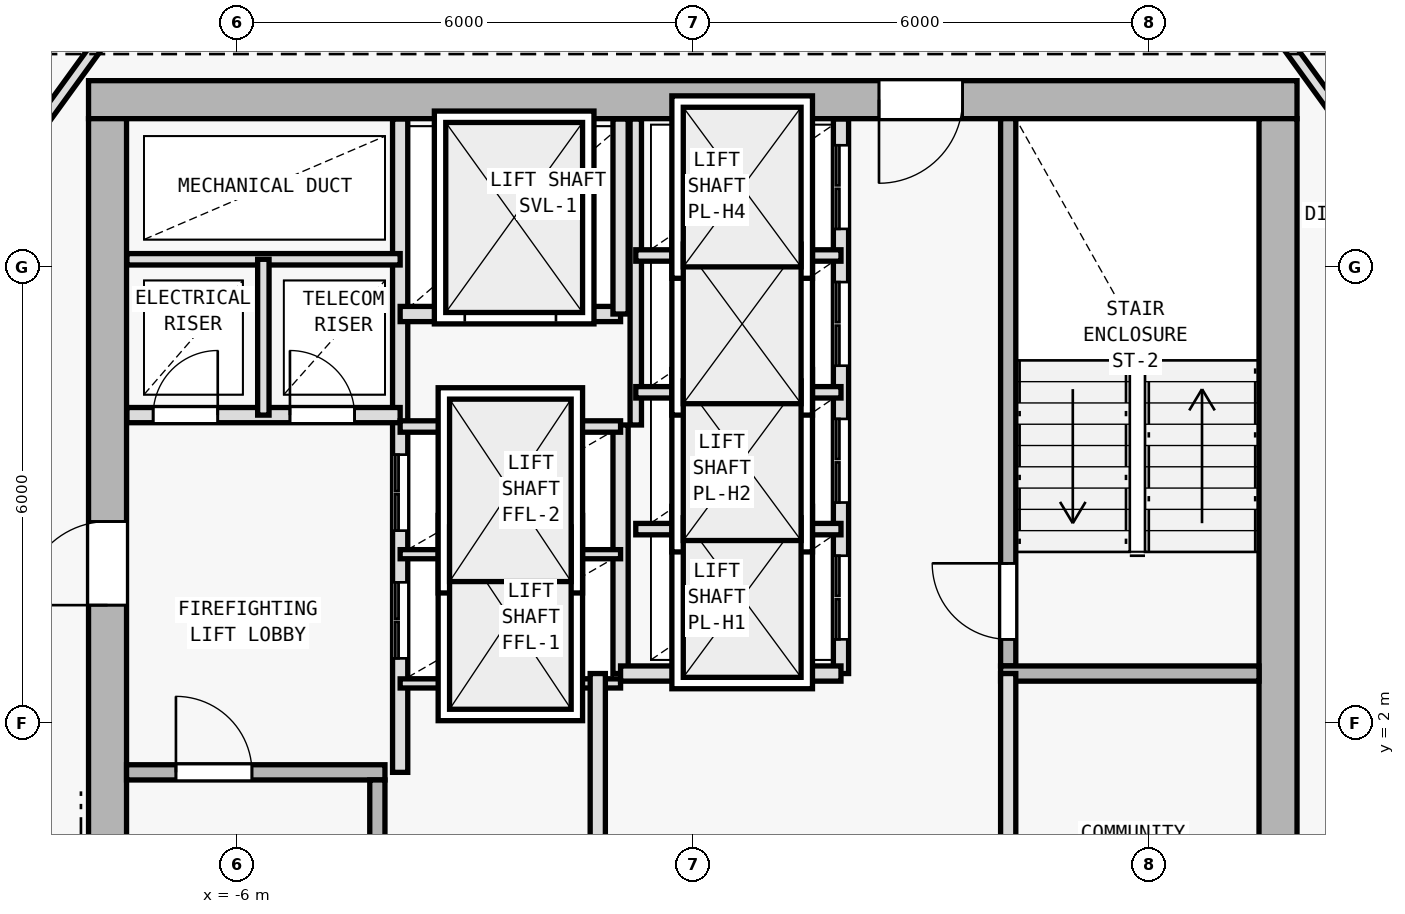
"""IFC4 building model, lengths in metres.
Left out: names, types, materials, properties, quantities, classifications, styles, units other than length and angle.
Written with IfcOpenShell. Run it as: python <this file> out.ifc"""

import sys

from ifc_helpers import new_model, si_unit, direction, frame, frame_2d, origin, origin_2d, place, context, subcontext, project, spatial, rectangle, i_section, extrude, element, fill, save


model = new_model("IFC4")
c1 = context("Model", 3, precision=1e-05, world=origin(), true_north=direction((0.0, 1.0)))
c2 = subcontext(c1, "Body", "Model", "MODEL_VIEW")
j1 = project(units=[si_unit("LENGTHUNIT", "METRE"), si_unit("PLANEANGLEUNIT", "RADIAN")], contexts=[c1])
p1 = place(None, origin())
s1 = spatial("IfcSite", under=j1, at=p1, CompositionType="ELEMENT")
p2 = place(p1, origin())
s2 = spatial("IfcBuilding", under=s1, at=p2, CompositionType="ELEMENT")
p3 = place(p2, frame((0.0, 0.0, 268.8)))
s3 = spatial("IfcBuildingStorey", under=s2, at=p3, CompositionType="ELEMENT", Elevation=268.8)
for number, where, z_axis, x_axis in (
    (1, (7.7, 10.2, 0.0), (0.0, 0.0, 1.0), (1.0, 0.0, 0.0)),
    (2, (-7.7, 10.2, 0.0), (0.0, 0.0, 1.0), (1.0, 0.0, 0.0)),
    (3, (7.7, 0.4, 0.0), (0.0, 0.0, 1.0), (1.0, 0.0, 0.0)),
    (4, (-7.7, 2.0, 0.0), (0.0, 0.0, 1.0), (1.0, 0.0, 0.0)),
):
    element("IfcColumn", number, at=place(p3, frame(where, z_axis=z_axis, x_axis=x_axis)), inside=s3, PredefinedType="COLUMN", context=c2, shape_type="SweptSolid", body=[
        extrude(i_section(OverallWidth=0.374, OverallDepth=0.372, WebThickness=0.012, FlangeThickness=0.02, FilletRadius=0.015, at=origin_2d()), origin(), (0.0, 0.0, 1.0), 3.6),
    ])
p4 = place(p3, frame((7.95, 10.2, 0.0), z_axis=(0.0, 0.0, 1.0), x_axis=(-1.0, 0.0, 0.0)))
e5 = element("IfcWall", 5, at=p4, inside=s3, PredefinedType="SHEAR", context=c2, shape_type="SweptSolid", body=[
    extrude(rectangle(XDim=15.9, YDim=0.5, at=frame_2d((7.95, 0.0))), origin(), (0.0, 0.0, 1.0), 3.35),
])
p5 = place(p4, frame((4.4, 0.0, 0.0)))
e6 = element("IfcOpeningElement", 6, at=p5, cuts=e5, PredefinedType="OPENING", context=c2, shape_type="SweptSolid", body=[
    extrude(rectangle(XDim=1.1, YDim=2.15, at=frame_2d((0.55, 1.075))), frame((0.0, 0.26, 0.0), z_axis=(0.0, -1.0, 0.0), x_axis=(1.0, 0.0, 0.0)), (0.0, 0.0, 1.0), 0.52),
])
p6 = place(p3, frame((-7.7, -9.15, 0.0), z_axis=(0.0, 0.0, 1.0), x_axis=(0.0, 1.0, 0.0)))
e7 = element("IfcWall", 7, at=p6, inside=s3, PredefinedType="SHEAR", context=c2, shape_type="SweptSolid", body=[
    extrude(rectangle(XDim=19.1, YDim=0.5, at=frame_2d((9.55, 0.0))), origin(), (0.0, 0.0, 1.0), 3.35),
])
p7 = place(p6, frame((12.7, 0.0, 0.0)))
e8 = element("IfcOpeningElement", 8, at=p7, cuts=e7, PredefinedType="OPENING", context=c2, shape_type="SweptSolid", body=[
    extrude(rectangle(XDim=1.1, YDim=2.15, at=frame_2d((0.55, 1.075))), frame((0.0, 0.26, 0.0), z_axis=(0.0, -1.0, 0.0), x_axis=(1.0, 0.0, 0.0)), (0.0, 0.0, 1.0), 0.52),
])
p8 = place(p3, frame((7.7, 9.95, 0.0), z_axis=(0.0, 0.0, 1.0), x_axis=(0.0, -1.0, 0.0)))
e9 = element("IfcWall", 9, at=p8, inside=s3, PredefinedType="SHEAR", context=c2, shape_type="SweptSolid", body=[
    extrude(rectangle(XDim=19.1, YDim=0.5, at=frame_2d((9.55, 0.0))), origin(), (0.0, 0.0, 1.0), 3.35),
])
p9 = place(p3, frame((-7.45, 1.35, 0.0), z_axis=(0.0, 0.0, 1.0), x_axis=(1.0, 0.0, 0.0)))
e10 = element("IfcWall", 10, at=p9, inside=s3, PredefinedType="SOLIDWALL", context=c2, shape_type="SweptSolid", body=[
    extrude(rectangle(XDim=3.4, YDim=0.2, at=frame_2d((1.7, 0.0))), origin(), (0.0, 0.0, 1.0), 3.35),
])
p10 = place(p9, frame((0.65, 0.0, 0.0)))
e11 = element("IfcOpeningElement", 11, at=p10, cuts=e10, PredefinedType="OPENING", context=c2, shape_type="SweptSolid", body=[
    extrude(rectangle(XDim=1.0, YDim=2.15, at=frame_2d((0.5, 1.075))), frame((0.0, 0.11, 0.0), z_axis=(0.0, -1.0, 0.0), x_axis=(1.0, 0.0, 0.0)), (0.0, 0.0, 1.0), 0.22),
])
p11 = place(p3, frame((-4.15, -5.95, 0.0), z_axis=(0.0, 0.0, 1.0), x_axis=(0.0, 1.0, 0.0)))
e12 = element("IfcWall", 12, at=p11, inside=s3, PredefinedType="SOLIDWALL", context=c2, shape_type="SweptSolid", body=[
    extrude(rectangle(XDim=7.2, YDim=0.2, at=frame_2d((3.6, 0.0))), origin(), (0.0, 0.0, 1.0), 3.35),
])
p12 = place(p3, frame((-3.85, 1.35, 0.0), z_axis=(0.0, 0.0, 1.0), x_axis=(0.0, 1.0, 0.0)))
e13 = element("IfcWall", 13, at=p12, inside=s3, PredefinedType="SOLIDWALL", context=c2, shape_type="SweptSolid", body=[
    extrude(rectangle(XDim=8.595, YDim=0.2, at=frame_2d((4.297, 0.0))), origin(), (0.0, 0.0, 1.0), 3.35),
])
p13 = place(p12, frame((1.5, 0.0, 0.0)))
e14 = element("IfcOpeningElement", 14, at=p13, cuts=e13, PredefinedType="OPENING", context=c2, shape_type="SweptSolid", body=[
    extrude(rectangle(XDim=1.0, YDim=2.15, at=frame_2d((0.5, 1.075))), frame((0.0, 0.11, 0.0), z_axis=(0.0, -1.0, 0.0), x_axis=(1.0, 0.0, 0.0)), (0.0, 0.0, 1.0), 0.22),
])
p14 = place(p12, frame((3.18, 0.0, 0.0)))
e15 = element("IfcOpeningElement", 15, at=p14, cuts=e13, PredefinedType="OPENING", context=c2, shape_type="SweptSolid", body=[
    extrude(rectangle(XDim=1.0, YDim=2.15, at=frame_2d((0.5, 1.075))), frame((0.0, 0.11, 0.0), z_axis=(0.0, -1.0, 0.0), x_axis=(1.0, 0.0, 0.0)), (0.0, 0.0, 1.0), 0.22),
])
p15 = place(p3, frame((-7.445, 6.05, 0.0), z_axis=(0.0, 0.0, 1.0), x_axis=(1.0, 0.0, 0.0)))
e16 = element("IfcWall", 16, at=p15, inside=s3, PredefinedType="SOLIDWALL", context=c2, shape_type="SweptSolid", body=[
    extrude(rectangle(XDim=3.595, YDim=0.2, at=frame_2d((1.797, 0.0))), origin(), (0.0, 0.0, 1.0), 3.35),
])
p16 = place(p15, frame((0.345, 0.0, 0.0)))
e17 = element("IfcOpeningElement", 17, at=p16, cuts=e16, PredefinedType="OPENING", context=c2, shape_type="SweptSolid", body=[
    extrude(rectangle(XDim=0.85, YDim=2.1, at=frame_2d((0.425, 1.05))), frame((0.0, 0.11, 0.0), z_axis=(0.0, -1.0, 0.0), x_axis=(1.0, 0.0, 0.0)), (0.0, 0.0, 1.0), 0.22),
])
p17 = place(p15, frame((2.145, 0.0, 0.0)))
e18 = element("IfcOpeningElement", 18, at=p17, cuts=e16, PredefinedType="OPENING", context=c2, shape_type="SweptSolid", body=[
    extrude(rectangle(XDim=0.85, YDim=2.1, at=frame_2d((0.425, 1.05))), frame((0.0, 0.11, 0.0), z_axis=(0.0, -1.0, 0.0), x_axis=(1.0, 0.0, 0.0)), (0.0, 0.0, 1.0), 0.22),
])
p18 = place(p3, frame((-7.445, 8.1, 0.0), z_axis=(0.0, 0.0, 1.0), x_axis=(1.0, 0.0, 0.0)))
e19 = element("IfcWall", 19, at=p18, inside=s3, PredefinedType="PARTITIONING", context=c2, shape_type="SweptSolid", body=[
    extrude(rectangle(XDim=3.595, YDim=0.15, at=frame_2d((1.797, 0.0))), origin(), (0.0, 0.0, 1.0), 3.35),
])
p19 = place(p3, frame((-5.65, 6.05, 0.0), z_axis=(0.0, 0.0, 1.0), x_axis=(0.0, 1.0, 0.0)))
e20 = element("IfcWall", 20, at=p19, inside=s3, PredefinedType="PARTITIONING", context=c2, shape_type="SweptSolid", body=[
    extrude(rectangle(XDim=2.05, YDim=0.15, at=frame_2d((1.025, 0.0))), origin(), (0.0, 0.0, 1.0), 3.35),
])
p20 = place(p3, frame((4.15, 2.75, 0.0), z_axis=(0.0, 0.0, 1.0), x_axis=(0.0, 1.0, 0.0)))
e21 = element("IfcWall", 21, at=p20, inside=s3, PredefinedType="SOLIDWALL", context=c2, shape_type="SweptSolid", body=[
    extrude(rectangle(XDim=7.2, YDim=0.2, at=frame_2d((3.6, 0.0))), origin(), (0.0, 0.0, 1.0), 3.35),
])
p21 = place(p20, frame((0.35, 0.0, 0.0)))
e22 = element("IfcOpeningElement", 22, at=p21, cuts=e21, PredefinedType="OPENING", context=c2, shape_type="SweptSolid", body=[
    extrude(rectangle(XDim=1.0, YDim=2.15, at=frame_2d((0.5, 1.075))), frame((0.0, 0.11, 0.0), z_axis=(0.0, -1.0, 0.0), x_axis=(1.0, 0.0, 0.0)), (0.0, 0.0, 1.0), 0.22),
])
p22 = place(p3, frame((4.05, 2.65, 0.0), z_axis=(0.0, 0.0, 1.0), x_axis=(1.0, 0.0, 0.0)))
e23 = element("IfcWall", 23, at=p22, inside=s3, PredefinedType="SOLIDWALL", context=c2, shape_type="SweptSolid", body=[
    extrude(rectangle(XDim=3.4, YDim=0.2, at=frame_2d((1.7, 0.0))), origin(), (0.0, 0.0, 1.0), 3.35),
])
p23 = place(p3, frame((-0.95, 2.65, 0.0), z_axis=(0.0, 0.0, 1.0), x_axis=(0.0, 1.0, 0.0)))
e24 = element("IfcWall", 24, at=p23, inside=s3, PredefinedType="SOLIDWALL", context=c2, shape_type="SweptSolid", body=[
    extrude(rectangle(XDim=3.27, YDim=0.2, at=frame_2d((1.635, 0.0))), origin(), (0.0, 0.0, 1.0), 3.35),
])
for number, where, z_axis, x_axis in (
    (25, (-3.85, 2.52, 0.0), (0.0, 0.0, 1.0), (1.0, 0.0, 0.0)),
    (26, (-3.85, 4.22, 0.0), (0.0, 0.0, 1.0), (1.0, 0.0, 0.0)),
):
    element("IfcWall", number, at=place(p3, frame(where, z_axis=z_axis, x_axis=x_axis)), inside=s3, PredefinedType="PARTITIONING", context=c2, shape_type="SweptSolid", body=[
        extrude(rectangle(XDim=2.9, YDim=0.12, at=frame_2d((1.45, 0.0))), origin(), (0.0, 0.0, 1.0), 3.35),
    ])
p24 = place(p3, frame((-3.85, 5.9, 0.0), z_axis=(0.0, 0.0, 1.0), x_axis=(1.0, 0.0, 0.0)))
e27 = element("IfcWall", 27, at=p24, inside=s3, PredefinedType="PARTITIONING", context=c2, shape_type="SweptSolid", body=[
    extrude(rectangle(XDim=2.9, YDim=0.15, at=frame_2d((1.45, 0.0))), origin(), (0.0, 0.0, 1.0), 3.35),
])
p25 = place(p3, frame((-3.85, 7.38, 0.0), z_axis=(0.0, 0.0, 1.0), x_axis=(1.0, 0.0, 0.0)))
e28 = element("IfcWall", 28, at=p25, inside=s3, PredefinedType="SOLIDWALL", context=c2, shape_type="SweptSolid", body=[
    extrude(rectangle(XDim=2.9, YDim=0.2, at=frame_2d((1.45, 0.0))), origin(), (0.0, 0.0, 1.0), 3.35),
])
p26 = place(p25, frame((0.85, 0.0, 0.0)))
e29 = element("IfcOpeningElement", 29, at=p26, cuts=e28, PredefinedType="OPENING", context=c2, shape_type="SweptSolid", body=[
    extrude(rectangle(XDim=1.2, YDim=2.2, at=frame_2d((0.6, 1.1))), frame((0.0, 0.11, 0.0), z_axis=(0.0, -1.0, 0.0), x_axis=(1.0, 0.0, 0.0)), (0.0, 0.0, 1.0), 0.22),
])
p27 = place(p3, frame((-0.95, 7.38, 0.0), z_axis=(0.0, 0.0, 1.0), x_axis=(0.0, 1.0, 0.0)))
e30 = element("IfcWall", 30, at=p27, inside=s3, PredefinedType="SOLIDWALL", context=c2, shape_type="SweptSolid", body=[
    extrude(rectangle(XDim=2.565, YDim=0.2, at=frame_2d((1.283, 0.0))), origin(), (0.0, 0.0, 1.0), 3.35),
])
p28 = place(p3, frame((4.15, -6.05, 0.0), z_axis=(0.0, 0.0, 1.0), x_axis=(0.0, 1.0, 0.0)))
e31 = element("IfcWall", 31, at=p28, inside=s3, PredefinedType="SOLIDWALL", context=c2, shape_type="SweptSolid", body=[
    extrude(rectangle(XDim=8.7, YDim=0.2, at=frame_2d((4.35, 0.0))), origin(), (0.0, 0.0, 1.0), 3.35),
])
p29 = place(p28, frame((3.6, 0.0, 0.0)))
e32 = element("IfcOpeningElement", 32, at=p29, cuts=e31, PredefinedType="OPENING", context=c2, shape_type="SweptSolid", body=[
    extrude(rectangle(XDim=0.95, YDim=2.1, at=frame_2d((0.475, 1.05))), frame((0.0, 0.11, 0.0), z_axis=(0.0, -1.0, 0.0), x_axis=(1.0, 0.0, 0.0)), (0.0, 0.0, 1.0), 0.22),
])
p30 = place(p3, frame((-1.25, -6.05, 0.0), z_axis=(0.0, 0.0, 1.0), x_axis=(0.0, 1.0, 0.0)))
e33 = element("IfcWall", 33, at=p30, inside=s3, PredefinedType="SOLIDWALL", context=c2, shape_type="SweptSolid", body=[
    extrude(rectangle(XDim=8.7, YDim=0.2, at=frame_2d((4.35, 0.0))), origin(), (0.0, 0.0, 1.0), 3.35),
])
p31 = place(p30, frame((3.4, 0.0, 0.0)))
e34 = element("IfcOpeningElement", 34, at=p31, cuts=e33, PredefinedType="OPENING", context=c2, shape_type="SweptSolid", body=[
    extrude(rectangle(XDim=0.95, YDim=2.1, at=frame_2d((0.475, 1.05))), frame((0.0, 0.11, 0.0), z_axis=(0.0, -1.0, 0.0), x_axis=(1.0, 0.0, 0.0)), (0.0, 0.0, 1.0), 0.22),
])
p32 = place(p3, frame((1.95, 2.65, 0.0), z_axis=(0.0, 0.0, 1.0), x_axis=(0.0, 1.0, 0.0)))
e35 = element("IfcWall", 35, at=p32, inside=s3, PredefinedType="SOLIDWALL", context=c2, shape_type="SweptSolid", body=[
    extrude(rectangle(XDim=7.295, YDim=0.2, at=frame_2d((3.647, 0.0))), origin(), (0.0, 0.0, 1.0), 3.35),
])
p33 = place(p32, frame((0.45, 0.0, 0.0)))
e36 = element("IfcOpeningElement", 36, at=p33, cuts=e35, PredefinedType="OPENING", context=c2, shape_type="SweptSolid", body=[
    extrude(rectangle(XDim=1.1, YDim=2.15, at=frame_2d((0.55, 1.075))), frame((0.0, 0.11, 0.0), z_axis=(0.0, -1.0, 0.0), x_axis=(1.0, 0.0, 0.0)), (0.0, 0.0, 1.0), 0.22),
])
p34 = place(p32, frame((2.25, 0.0, 0.0)))
e37 = element("IfcOpeningElement", 37, at=p34, cuts=e35, PredefinedType="OPENING", context=c2, shape_type="SweptSolid", body=[
    extrude(rectangle(XDim=1.1, YDim=2.15, at=frame_2d((0.55, 1.075))), frame((0.0, 0.11, 0.0), z_axis=(0.0, -1.0, 0.0), x_axis=(1.0, 0.0, 0.0)), (0.0, 0.0, 1.0), 0.22),
])
p35 = place(p32, frame((4.05, 0.0, 0.0)))
e38 = element("IfcOpeningElement", 38, at=p35, cuts=e35, PredefinedType="OPENING", context=c2, shape_type="SweptSolid", body=[
    extrude(rectangle(XDim=1.1, YDim=2.15, at=frame_2d((0.55, 1.075))), frame((0.0, 0.11, 0.0), z_axis=(0.0, -1.0, 0.0), x_axis=(1.0, 0.0, 0.0)), (0.0, 0.0, 1.0), 0.22),
])
p36 = place(p32, frame((5.85, 0.0, 0.0)))
e39 = element("IfcOpeningElement", 39, at=p36, cuts=e35, PredefinedType="OPENING", context=c2, shape_type="SweptSolid", body=[
    extrude(rectangle(XDim=1.1, YDim=2.15, at=frame_2d((0.55, 1.075))), frame((0.0, 0.11, 0.0), z_axis=(0.0, -1.0, 0.0), x_axis=(1.0, 0.0, 0.0)), (0.0, 0.0, 1.0), 0.22),
])
p37 = place(p3, frame((-0.95, 2.65, 0.0), z_axis=(0.0, 0.0, 1.0), x_axis=(1.0, 0.0, 0.0)))
e40 = element("IfcWall", 40, at=p37, inside=s3, PredefinedType="SOLIDWALL", context=c2, shape_type="SweptSolid", body=[
    extrude(rectangle(XDim=2.9, YDim=0.2, at=frame_2d((1.45, 0.0))), origin(), (0.0, 0.0, 1.0), 3.35),
])
p38 = place(p3, frame((-0.75, 5.92, 0.0), z_axis=(0.0, 0.0, 1.0), x_axis=(0.0, 1.0, 0.0)))
e41 = element("IfcWall", 41, at=p38, inside=s3, PredefinedType="PARTITIONING", context=c2, shape_type="SweptSolid", body=[
    extrude(rectangle(XDim=4.025, YDim=0.15, at=frame_2d((2.013, 0.0))), origin(), (0.0, 0.0, 1.0), 3.35),
])
for number, where, z_axis, x_axis in (
    (42, (-0.75, 4.55, 0.0), (0.0, 0.0, 1.0), (1.0, 0.0, 0.0)),
    (43, (-0.75, 6.35, 0.0), (0.0, 0.0, 1.0), (1.0, 0.0, 0.0)),
    (44, (-0.75, 8.15, 0.0), (0.0, 0.0, 1.0), (1.0, 0.0, 0.0)),
):
    element("IfcWall", number, at=place(p3, frame(where, z_axis=z_axis, x_axis=x_axis)), inside=s3, PredefinedType="PARTITIONING", context=c2, shape_type="SweptSolid", body=[
        extrude(rectangle(XDim=2.7, YDim=0.15, at=frame_2d((1.35, 0.0))), origin(), (0.0, 0.0, 1.0), 3.35),
    ])
p39 = place(p3, frame((-9.78, 8.226, 0.0), z_axis=(0.0, 0.0, 1.0), x_axis=(0.586956386413, 0.809618552436, 0.0)))
e45 = element("IfcWall", 45, at=p39, inside=s3, PredefinedType="PARTITIONING", context=c2, shape_type="SweptSolid", body=[
    extrude(rectangle(XDim=5.008, YDim=0.15, at=frame_2d((2.504, 0.0))), origin(), (0.0, 0.0, 1.0), 3.015),
])
p40 = place(p3, frame((6.841, 12.28, 0.0), z_axis=(0.0, 0.0, 1.0), x_axis=(0.586956386413, -0.809618552436, 0.0)))
e46 = element("IfcWall", 46, at=p40, inside=s3, PredefinedType="PARTITIONING", context=c2, shape_type="SweptSolid", body=[
    extrude(rectangle(XDim=5.008, YDim=0.15, at=frame_2d((2.504, 0.0))), origin(), (0.0, 0.0, 1.0), 2.995),
])
p41 = place(p40, frame((2.954, 0.0, 0.0)))
e47 = element("IfcOpeningElement", 47, at=p41, cuts=e46, PredefinedType="OPENING", context=c2, shape_type="SweptSolid", body=[
    extrude(rectangle(XDim=0.9, YDim=2.1, at=frame_2d((0.45, 1.05))), frame((0.0, 0.085, 0.0), z_axis=(0.0, -1.0, 0.0), x_axis=(1.0, 0.0, 0.0)), (0.0, 0.0, 1.0), 0.17),
])
p42 = place(p7, origin())
e48 = element("IfcDoor", 48, at=p42, inside=s3, OperationType="SINGLE_SWING_LEFT", PredefinedType="DOOR", context=c2, shape_type="SweptSolid", body=[
    extrude(rectangle(XDim=1.1, YDim=2.15, at=frame_2d((0.55, 1.075))), frame((0.0, 0.025, 0.0), z_axis=(0.0, -1.0, 0.0), x_axis=(1.0, 0.0, 0.0)), (0.0, 0.0, 1.0), 0.05),
])
fill(e8, e48)
p43 = place(p5, origin())
e49 = element("IfcDoor", 49, at=p43, inside=s3, OperationType="SINGLE_SWING_RIGHT", PredefinedType="DOOR", context=c2, shape_type="SweptSolid", body=[
    extrude(rectangle(XDim=1.1, YDim=2.15, at=frame_2d((0.55, 1.075))), frame((0.0, 0.025, 0.0), z_axis=(0.0, -1.0, 0.0), x_axis=(1.0, 0.0, 0.0)), (0.0, 0.0, 1.0), 0.05),
])
fill(e6, e49)
p44 = place(p10, origin())
e50 = element("IfcDoor", 50, at=p44, inside=s3, OperationType="SINGLE_SWING_LEFT", PredefinedType="DOOR", context=c2, shape_type="SweptSolid", body=[
    extrude(rectangle(XDim=1.0, YDim=2.15, at=frame_2d((0.5, 1.075))), frame((0.0, 0.025, 0.0), z_axis=(0.0, -1.0, 0.0), x_axis=(1.0, 0.0, 0.0)), (0.0, 0.0, 1.0), 0.05),
])
fill(e11, e50)
p45 = place(p16, origin())
e51 = element("IfcDoor", 51, at=p45, inside=s3, OperationType="SINGLE_SWING_RIGHT", PredefinedType="DOOR", context=c2, shape_type="SweptSolid", body=[
    extrude(rectangle(XDim=0.85, YDim=2.1, at=frame_2d((0.425, 1.05))), frame((0.0, 0.025, 0.0), z_axis=(0.0, -1.0, 0.0), x_axis=(1.0, 0.0, 0.0)), (0.0, 0.0, 1.0), 0.05),
])
fill(e17, e51)
p46 = place(p17, origin())
e52 = element("IfcDoor", 52, at=p46, inside=s3, OperationType="SINGLE_SWING_LEFT", PredefinedType="DOOR", context=c2, shape_type="SweptSolid", body=[
    extrude(rectangle(XDim=0.85, YDim=2.1, at=frame_2d((0.425, 1.05))), frame((0.0, 0.025, 0.0), z_axis=(0.0, -1.0, 0.0), x_axis=(1.0, 0.0, 0.0)), (0.0, 0.0, 1.0), 0.05),
])
fill(e18, e52)
p47 = place(p21, origin())
e53 = element("IfcDoor", 53, at=p47, inside=s3, OperationType="SINGLE_SWING_RIGHT", PredefinedType="DOOR", context=c2, shape_type="SweptSolid", body=[
    extrude(rectangle(XDim=1.0, YDim=2.15, at=frame_2d((0.5, 1.075))), frame((0.0, 0.025, 0.0), z_axis=(0.0, -1.0, 0.0), x_axis=(1.0, 0.0, 0.0)), (0.0, 0.0, 1.0), 0.05),
])
fill(e22, e53)
p48 = place(p26, origin())
e54 = element("IfcDoor", 54, at=p48, inside=s3, OperationType="DOUBLE_DOOR_SLIDING", PredefinedType="DOOR", context=c2, shape_type="SweptSolid", body=[
    extrude(rectangle(XDim=1.2, YDim=2.2, at=frame_2d((0.6, 1.1))), frame((0.0, 0.025, 0.0), z_axis=(0.0, -1.0, 0.0), x_axis=(1.0, 0.0, 0.0)), (0.0, 0.0, 1.0), 0.05),
])
fill(e29, e54)
p49 = place(p33, origin())
e55 = element("IfcDoor", 55, at=p49, inside=s3, OperationType="DOUBLE_DOOR_SLIDING", PredefinedType="DOOR", context=c2, shape_type="SweptSolid", body=[
    extrude(rectangle(XDim=1.1, YDim=2.15, at=frame_2d((0.55, 1.075))), frame((0.0, 0.025, 0.0), z_axis=(0.0, -1.0, 0.0), x_axis=(1.0, 0.0, 0.0)), (0.0, 0.0, 1.0), 0.05),
])
fill(e36, e55)
p50 = place(p34, origin())
e56 = element("IfcDoor", 56, at=p50, inside=s3, OperationType="DOUBLE_DOOR_SLIDING", PredefinedType="DOOR", context=c2, shape_type="SweptSolid", body=[
    extrude(rectangle(XDim=1.1, YDim=2.15, at=frame_2d((0.55, 1.075))), frame((0.0, 0.025, 0.0), z_axis=(0.0, -1.0, 0.0), x_axis=(1.0, 0.0, 0.0)), (0.0, 0.0, 1.0), 0.05),
])
fill(e37, e56)
p51 = place(p35, origin())
e57 = element("IfcDoor", 57, at=p51, inside=s3, OperationType="DOUBLE_DOOR_SLIDING", PredefinedType="DOOR", context=c2, shape_type="SweptSolid", body=[
    extrude(rectangle(XDim=1.1, YDim=2.15, at=frame_2d((0.55, 1.075))), frame((0.0, 0.025, 0.0), z_axis=(0.0, -1.0, 0.0), x_axis=(1.0, 0.0, 0.0)), (0.0, 0.0, 1.0), 0.05),
])
fill(e38, e57)
p52 = place(p36, origin())
e58 = element("IfcDoor", 58, at=p52, inside=s3, OperationType="DOUBLE_DOOR_SLIDING", PredefinedType="DOOR", context=c2, shape_type="SweptSolid", body=[
    extrude(rectangle(XDim=1.1, YDim=2.15, at=frame_2d((0.55, 1.075))), frame((0.0, 0.025, 0.0), z_axis=(0.0, -1.0, 0.0), x_axis=(1.0, 0.0, 0.0)), (0.0, 0.0, 1.0), 0.05),
])
fill(e39, e58)
p53 = place(p13, origin())
e59 = element("IfcDoor", 59, at=p53, inside=s3, OperationType="DOUBLE_DOOR_SLIDING", PredefinedType="DOOR", context=c2, shape_type="SweptSolid", body=[
    extrude(rectangle(XDim=1.0, YDim=2.15, at=frame_2d((0.5, 1.075))), frame((0.0, 0.025, 0.0), z_axis=(0.0, -1.0, 0.0), x_axis=(1.0, 0.0, 0.0)), (0.0, 0.0, 1.0), 0.05),
])
fill(e14, e59)
p54 = place(p14, origin())
e60 = element("IfcDoor", 60, at=p54, inside=s3, OperationType="DOUBLE_DOOR_SLIDING", PredefinedType="DOOR", context=c2, shape_type="SweptSolid", body=[
    extrude(rectangle(XDim=1.0, YDim=2.15, at=frame_2d((0.5, 1.075))), frame((0.0, 0.025, 0.0), z_axis=(0.0, -1.0, 0.0), x_axis=(1.0, 0.0, 0.0)), (0.0, 0.0, 1.0), 0.05),
])
fill(e15, e60)
save(model, sys.argv[1])
